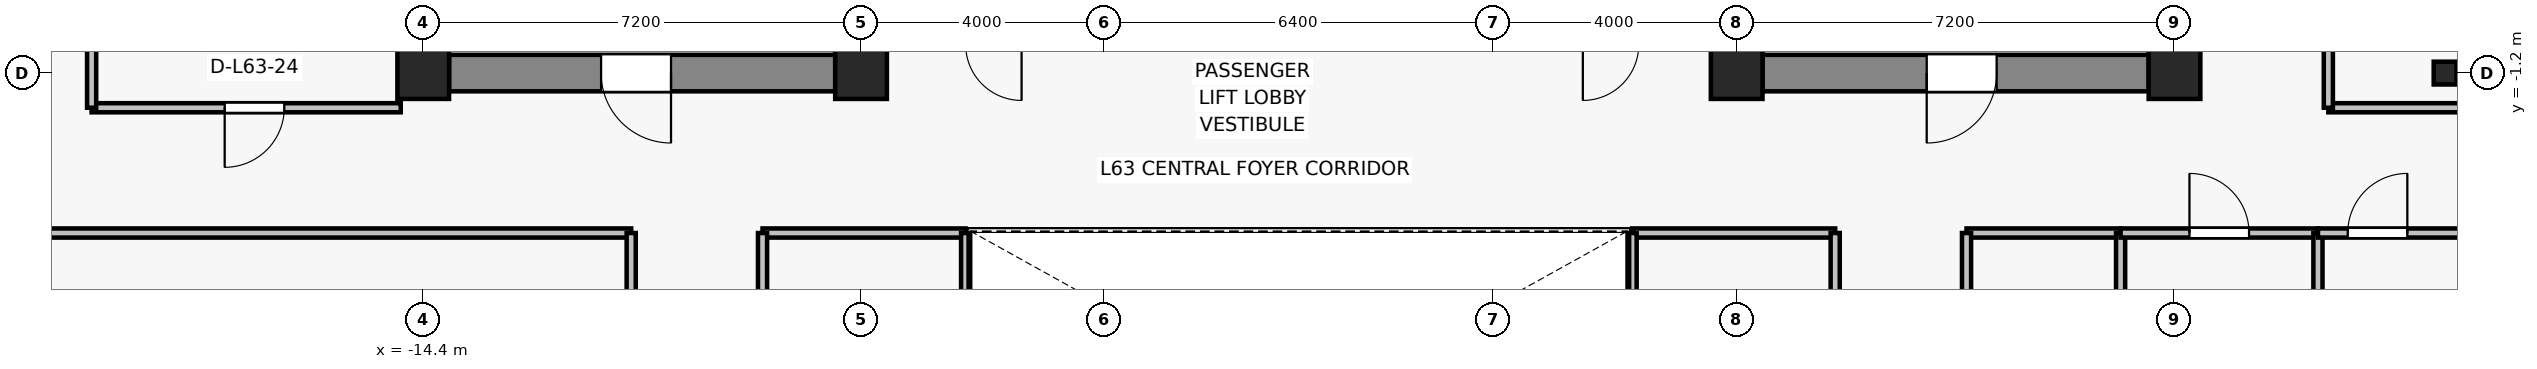
"""IFC4 building model, lengths in metres.
Left out: names, types, materials, properties, quantities, classifications, styles, units other than length and angle.
Written with IfcOpenShell. Run it as: python <this file> out.ifc"""

import sys

from ifc_helpers import new_model, si_unit, direction, frame, frame_2d, origin, origin_2d, place, context, subcontext, project, spatial, rectangle, i_section, extrude, source, transform, mapped, element, fill, save


model = new_model("IFC4")
c1 = context("Model", 3, precision=1e-05, world=origin(), true_north=direction((0.0, 1.0)))
c2 = subcontext(c1, "Body", "Model", "MODEL_VIEW")
j1 = project(units=[si_unit("LENGTHUNIT", "METRE"), si_unit("PLANEANGLEUNIT", "RADIAN")], contexts=[c1])
p1 = place(None, origin())
s1 = spatial("IfcSite", under=j1, at=p1, CompositionType="ELEMENT")
p2 = place(p1, origin())
s2 = spatial("IfcBuilding", under=s1, at=p2, CompositionType="ELEMENT")
p3 = place(p2, frame((0.0, 0.0, 225.4)))
s3 = spatial("IfcBuildingStorey", under=s2, at=p3, CompositionType="ELEMENT", Elevation=225.4)
for number, where, z_axis, x_axis in (
    (1, (-14.4, -1.2, 0.0), (0.0, 0.0, 1.0), (1.0, 0.0, 0.0)),
    (2, (-7.2, -1.2, 0.0), (0.0, 0.0, 1.0), (1.0, 0.0, 0.0)),
    (3, (7.2, -1.2, 0.0), (0.0, 0.0, 1.0), (1.0, 0.0, 0.0)),
    (4, (14.4, -1.2, 0.0), (0.0, 0.0, 1.0), (1.0, 0.0, 0.0)),
):
    element("IfcColumn", number, at=place(p3, frame(where, z_axis=z_axis, x_axis=x_axis)), inside=s3, PredefinedType="COLUMN", context=c2, shape_type="SweptSolid", body=[
        extrude(rectangle(XDim=0.85, YDim=0.85, at=origin_2d()), origin(), (0.0, 0.0, 1.0), 3.3),
    ])
p4 = place(p3, frame((18.85, -1.2, 0.0), z_axis=(0.0, 0.0, 1.0), x_axis=(1.0, 0.0, 0.0)))
e5 = element("IfcColumn", 5, at=p4, inside=s3, PredefinedType="COLUMN", context=c2, shape_type="SweptSolid", body=[
    extrude(i_section(OverallWidth=0.375, OverallDepth=0.375, WebThickness=0.017, FlangeThickness=0.027, FilletRadius=0.015, at=origin_2d()), origin(), (0.0, 0.0, 1.0), 3.3),
])
p5 = place(p3, frame((-7.625, -1.2, 0.0), z_axis=(0.0, 0.0, 1.0), x_axis=(-1.0, 0.0, 0.0)))
e6 = element("IfcWall", 6, at=p5, inside=s3, PredefinedType="SHEAR", context=c2, shape_type="SweptSolid", body=[
    extrude(rectangle(XDim=6.35, YDim=0.6, at=frame_2d((3.175, 0.0))), origin(), (0.0, 0.0, 1.0), 3.075),
])
p6 = place(p5, frame((2.7, 0.0, 0.0)))
e7 = element("IfcOpeningElement", 7, at=p6, cuts=e6, PredefinedType="OPENING", context=c2, shape_type="SweptSolid", body=[
    extrude(rectangle(XDim=1.15, YDim=2.15, at=frame_2d((0.575, 1.075))), frame((0.0, 0.31, 0.0), z_axis=(0.0, -1.0, 0.0), x_axis=(1.0, 0.0, 0.0)), (0.0, 0.0, 1.0), 0.62),
])
p7 = place(p3, frame((13.975, -1.2, 0.0), z_axis=(0.0, 0.0, 1.0), x_axis=(-1.0, 0.0, 0.0)))
e8 = element("IfcWall", 8, at=p7, inside=s3, PredefinedType="SHEAR", context=c2, shape_type="SweptSolid", body=[
    extrude(rectangle(XDim=6.35, YDim=0.6, at=frame_2d((3.175, 0.0))), origin(), (0.0, 0.0, 1.0), 3.075),
])
p8 = place(p7, frame((2.5, 0.0, 0.0)))
e9 = element("IfcOpeningElement", 9, at=p8, cuts=e8, PredefinedType="OPENING", context=c2, shape_type="SweptSolid", body=[
    extrude(rectangle(XDim=1.15, YDim=2.15, at=frame_2d((0.575, 1.075))), frame((0.0, 0.31, 0.0), z_axis=(0.0, -1.0, 0.0), x_axis=(1.0, 0.0, 0.0)), (0.0, 0.0, 1.0), 0.62),
])
for number, where, z_axis, x_axis in (
    (10, (-7.4, -0.9, 0.0), (0.0, 0.0, 1.0), (0.0, 1.0, 0.0)),
    (11, (7.4, -0.9, 0.0), (0.0, 0.0, 1.0), (0.0, 1.0, 0.0)),
):
    element("IfcWall", number, at=place(p3, frame(where, z_axis=z_axis, x_axis=x_axis)), inside=s3, PredefinedType="SHEAR", context=c2, shape_type="SweptSolid", body=[
        extrude(rectangle(XDim=4.15, YDim=0.45, at=frame_2d((2.075, 0.0))), origin(), (0.0, 0.0, 1.0), 3.075),
    ])
p9 = place(p3, frame((-23.53, -3.83, 0.0), z_axis=(0.0, 0.0, 1.0), x_axis=(1.0, 0.0, 0.0)))
e12 = element("IfcWall", 12, at=p9, inside=s3, PredefinedType="PARTITIONING", context=c2, shape_type="SweptSolid", body=[
    extrude(rectangle(XDim=12.55, YDim=0.15, at=frame_2d((6.275, 0.0))), origin(), (0.0, 0.0, 1.0), 2.615),
])
p10 = place(p3, frame((-10.98, -3.83, 0.0), z_axis=(0.0, 0.0, 1.0), x_axis=(0.0, -1.0, 0.0)))
e13 = element("IfcWall", 13, at=p10, inside=s3, PredefinedType="PARTITIONING", context=c2, shape_type="SweptSolid", body=[
    extrude(rectangle(XDim=13.2, YDim=0.15, at=frame_2d((6.6, 0.0))), origin(), (0.0, 0.0, 1.0), 2.615),
])
p11 = place(p10, frame((2.88, 0.0, 0.0)))
e14 = element("IfcOpeningElement", 14, at=p11, cuts=e13, PredefinedType="OPENING", context=c2, shape_type="SweptSolid", body=[
    extrude(rectangle(XDim=0.98, YDim=2.15, at=frame_2d((0.49, 1.075))), frame((0.0, 0.085, 0.0), z_axis=(0.0, -1.0, 0.0), x_axis=(1.0, 0.0, 0.0)), (0.0, 0.0, 1.0), 0.17),
])
p12 = place(p3, frame((10.98, -3.83, 0.0), z_axis=(0.0, 0.0, 1.0), x_axis=(1.0, 0.0, 0.0)))
e15 = element("IfcWall", 15, at=p12, inside=s3, PredefinedType="PARTITIONING", context=c2, shape_type="SweptSolid", body=[
    extrude(rectangle(XDim=2.533, YDim=0.15, at=frame_2d((1.267, 0.0))), origin(), (0.0, 0.0, 1.0), 3.075),
])
p13 = place(p3, frame((10.98, -17.03, 0.0), z_axis=(0.0, 0.0, 1.0), x_axis=(0.0, 1.0, 0.0)))
e16 = element("IfcWall", 16, at=p13, inside=s3, PredefinedType="PARTITIONING", context=c2, shape_type="SweptSolid", body=[
    extrude(rectangle(XDim=13.2, YDim=0.15, at=frame_2d((6.6, 0.0))), origin(), (0.0, 0.0, 1.0), 2.615),
])
p14 = place(p13, frame((9.34, 0.0, 0.0)))
e17 = element("IfcOpeningElement", 17, at=p14, cuts=e16, PredefinedType="OPENING", context=c2, shape_type="SweptSolid", body=[
    extrude(rectangle(XDim=0.98, YDim=2.15, at=frame_2d((0.49, 1.075))), frame((0.0, 0.085, 0.0), z_axis=(0.0, -1.0, 0.0), x_axis=(1.0, 0.0, 0.0)), (0.0, 0.0, 1.0), 0.17),
])
p15 = place(p3, frame((13.513, -3.83, 0.0), z_axis=(0.0, 0.0, 1.0), x_axis=(0.0, -1.0, 0.0)))
e18 = element("IfcWall", 18, at=p15, inside=s3, PredefinedType="PARTITIONING", context=c2, shape_type="SweptSolid", body=[
    extrude(rectangle(XDim=13.2, YDim=0.15, at=frame_2d((6.6, 0.0))), origin(), (0.0, 0.0, 1.0), 2.615),
])
p16 = place(p3, frame((13.513, -3.83, 0.0), z_axis=(0.0, 0.0, 1.0), x_axis=(1.0, 0.0, 0.0)))
e19 = element("IfcWall", 19, at=p16, inside=s3, PredefinedType="PARTITIONING", context=c2, shape_type="SweptSolid", body=[
    extrude(rectangle(XDim=3.246, YDim=0.15, at=frame_2d((1.623, 0.0))), origin(), (0.0, 0.0, 1.0), 2.615),
])
p17 = place(p16, frame((1.133, 0.0, 0.0)))
e20 = element("IfcOpeningElement", 20, at=p17, cuts=e19, PredefinedType="OPENING", context=c2, shape_type="SweptSolid", body=[
    extrude(rectangle(XDim=0.98, YDim=2.15, at=frame_2d((0.49, 1.075))), frame((0.0, 0.085, 0.0), z_axis=(0.0, -1.0, 0.0), x_axis=(1.0, 0.0, 0.0)), (0.0, 0.0, 1.0), 0.17),
])
p18 = place(p3, frame((16.759, -3.83, 0.0), z_axis=(0.0, 0.0, 1.0), x_axis=(0.0, -1.0, 0.0)))
e21 = element("IfcWall", 21, at=p18, inside=s3, PredefinedType="PARTITIONING", context=c2, shape_type="SweptSolid", body=[
    extrude(rectangle(XDim=13.2, YDim=0.15, at=frame_2d((6.6, 0.0))), origin(), (0.0, 0.0, 1.0), 2.615),
])
p19 = place(p3, frame((16.759, -3.83, 0.0), z_axis=(0.0, 0.0, 1.0), x_axis=(1.0, 0.0, 0.0)))
e22 = element("IfcWall", 22, at=p19, inside=s3, PredefinedType="PARTITIONING", context=c2, shape_type="SweptSolid", body=[
    extrude(rectangle(XDim=2.771, YDim=0.15, at=frame_2d((1.385, 0.0))), origin(), (0.0, 0.0, 1.0), 2.765),
])
p20 = place(p19, frame((0.49, 0.0, 0.0)))
e23 = element("IfcOpeningElement", 23, at=p20, cuts=e22, PredefinedType="OPENING", context=c2, shape_type="SweptSolid", body=[
    extrude(rectangle(XDim=0.98, YDim=2.15, at=frame_2d((0.49, 1.075))), frame((0.0, 0.085, 0.0), z_axis=(0.0, -1.0, 0.0), x_axis=(1.0, 0.0, 0.0)), (0.0, 0.0, 1.0), 0.17),
])
p21 = place(p3, frame((-8.82, -3.83, 0.0), z_axis=(0.0, 0.0, 1.0), x_axis=(1.0, 0.0, 0.0)))
e24 = element("IfcWall", 24, at=p21, inside=s3, PredefinedType="PARTITIONING", context=c2, shape_type="SweptSolid", body=[
    extrude(rectangle(XDim=3.34, YDim=0.15, at=frame_2d((1.67, 0.0))), origin(), (0.0, 0.0, 1.0), 2.615),
])
p22 = place(p3, frame((-8.82, -17.03, 0.0), z_axis=(0.0, 0.0, 1.0), x_axis=(0.0, 1.0, 0.0)))
e25 = element("IfcWall", 25, at=p22, inside=s3, PredefinedType="PARTITIONING", context=c2, shape_type="SweptSolid", body=[
    extrude(rectangle(XDim=13.2, YDim=0.15, at=frame_2d((6.6, 0.0))), origin(), (0.0, 0.0, 1.0), 2.615),
])
p23 = place(p22, frame((9.385, 0.0, 0.0)))
e26 = element("IfcOpeningElement", 26, at=p23, cuts=e25, PredefinedType="OPENING", context=c2, shape_type="SweptSolid", body=[
    extrude(rectangle(XDim=0.98, YDim=2.15, at=frame_2d((0.49, 1.075))), frame((0.0, 0.085, 0.0), z_axis=(0.0, -1.0, 0.0), x_axis=(1.0, 0.0, 0.0)), (0.0, 0.0, 1.0), 0.17),
])
p24 = place(p3, frame((-5.48, -3.83, 0.0), z_axis=(0.0, 0.0, 1.0), x_axis=(0.0, -1.0, 0.0)))
e27 = element("IfcWall", 27, at=p24, inside=s3, PredefinedType="PARTITIONING", context=c2, shape_type="SweptSolid", body=[
    extrude(rectangle(XDim=13.2, YDim=0.15, at=frame_2d((6.6, 0.0))), origin(), (0.0, 0.0, 1.0), 2.615),
])
p25 = place(p24, frame((7.22, 0.0, 0.0)))
e28 = element("IfcOpeningElement", 28, at=p25, cuts=e27, PredefinedType="OPENING", context=c2, shape_type="SweptSolid", body=[
    extrude(rectangle(XDim=0.98, YDim=2.15, at=frame_2d((0.49, 1.075))), frame((0.0, 0.085, 0.0), z_axis=(0.0, -1.0, 0.0), x_axis=(1.0, 0.0, 0.0)), (0.0, 0.0, 1.0), 0.17),
])
p26 = place(p3, frame((5.48, -3.83, 0.0), z_axis=(0.0, 0.0, 1.0), x_axis=(1.0, 0.0, 0.0)))
e29 = element("IfcWall", 29, at=p26, inside=s3, PredefinedType="PARTITIONING", context=c2, shape_type="SweptSolid", body=[
    extrude(rectangle(XDim=3.34, YDim=0.15, at=frame_2d((1.67, 0.0))), origin(), (0.0, 0.0, 1.0), 2.615),
])
p27 = place(p3, frame((5.48, -17.03, 0.0), z_axis=(0.0, 0.0, 1.0), x_axis=(0.0, 1.0, 0.0)))
e30 = element("IfcWall", 30, at=p27, inside=s3, PredefinedType="PARTITIONING", context=c2, shape_type="SweptSolid", body=[
    extrude(rectangle(XDim=13.2, YDim=0.15, at=frame_2d((6.6, 0.0))), origin(), (0.0, 0.0, 1.0), 2.615),
])
p28 = place(p3, frame((8.82, -3.83, 0.0), z_axis=(0.0, 0.0, 1.0), x_axis=(0.0, -1.0, 0.0)))
e31 = element("IfcWall", 31, at=p28, inside=s3, PredefinedType="PARTITIONING", context=c2, shape_type="SweptSolid", body=[
    extrude(rectangle(XDim=13.2, YDim=0.15, at=frame_2d((6.6, 0.0))), origin(), (0.0, 0.0, 1.0), 2.615),
])
p29 = place(p28, frame((2.835, 0.0, 0.0)))
e32 = element("IfcOpeningElement", 32, at=p29, cuts=e31, PredefinedType="OPENING", context=c2, shape_type="SweptSolid", body=[
    extrude(rectangle(XDim=0.98, YDim=2.15, at=frame_2d((0.49, 1.075))), frame((0.0, 0.085, 0.0), z_axis=(0.0, -1.0, 0.0), x_axis=(1.0, 0.0, 0.0)), (0.0, 0.0, 1.0), 0.17),
])
p30 = place(p3, frame((-14.77, -1.77, 0.0), z_axis=(0.0, 0.0, 1.0), x_axis=(-1.0, 0.0, 0.0)))
e33 = element("IfcWall", 33, at=p30, inside=s3, PredefinedType="PARTITIONING", context=c2, shape_type="SweptSolid", body=[
    extrude(rectangle(XDim=5.083, YDim=0.15, at=frame_2d((2.542, 0.0))), origin(), (0.0, 0.0, 1.0), 3.075),
])
p31 = place(p30, frame((1.915, 0.0, 0.0)))
e34 = element("IfcOpeningElement", 34, at=p31, cuts=e33, PredefinedType="OPENING", context=c2, shape_type="SweptSolid", body=[
    extrude(rectangle(XDim=0.98, YDim=2.15, at=frame_2d((0.49, 1.075))), frame((0.0, 0.085, 0.0), z_axis=(0.0, -1.0, 0.0), x_axis=(1.0, 0.0, 0.0)), (0.0, 0.0, 1.0), 0.17),
])
p32 = place(p3, frame((-19.853, -1.77, 0.0), z_axis=(0.0, 0.0, 1.0), x_axis=(0.0, 1.0, 0.0)))
e35 = element("IfcWall", 35, at=p32, inside=s3, PredefinedType="PARTITIONING", context=c2, shape_type="SweptSolid", body=[
    extrude(rectangle(XDim=15.65, YDim=0.15, at=frame_2d((7.825, 0.0))), origin(), (0.0, 0.0, 1.0), 2.615),
])
p33 = place(p3, frame((19.53, -1.77, 0.0), z_axis=(0.0, 0.0, 1.0), x_axis=(-1.0, 0.0, 0.0)))
e36 = element("IfcWall", 36, at=p33, inside=s3, PredefinedType="PARTITIONING", context=c2, shape_type="SweptSolid", body=[
    extrude(rectangle(XDim=2.6, YDim=0.15, at=frame_2d((1.3, 0.0))), origin(), (0.0, 0.0, 1.0), 2.765),
])
p34 = place(p3, frame((16.93, -1.77, 0.0), z_axis=(0.0, 0.0, 1.0), x_axis=(0.0, 1.0, 0.0)))
e37 = element("IfcWall", 37, at=p34, inside=s3, PredefinedType="PARTITIONING", context=c2, shape_type="SweptSolid", body=[
    extrude(rectangle(XDim=15.65, YDim=0.15, at=frame_2d((7.825, 0.0))), origin(), (0.0, 0.0, 1.0), 2.615),
])
p35 = place(p34, frame((7.335, 0.0, 0.0)))
e38 = element("IfcOpeningElement", 38, at=p35, cuts=e37, PredefinedType="OPENING", context=c2, shape_type="SweptSolid", body=[
    extrude(rectangle(XDim=0.98, YDim=2.15, at=frame_2d((0.49, 1.075))), frame((0.0, 0.085, 0.0), z_axis=(0.0, -1.0, 0.0), x_axis=(1.0, 0.0, 0.0)), (0.0, 0.0, 1.0), 0.17),
])
m1 = source(origin(), c2, "Body", "SweptSolid", [
    extrude(rectangle(XDim=1.15, YDim=2.15, at=frame_2d((0.575, 1.075))), frame((0.0, 0.025, 0.0), z_axis=(0.0, -1.0, 0.0), x_axis=(1.0, 0.0, 0.0)), (0.0, 0.0, 1.0), 0.05),
])
p36 = place(p6, origin())
e39 = element("IfcDoor", 39, at=p36, inside=s3, OperationType="SINGLE_SWING_LEFT", PredefinedType="DOOR", context=c2, shape_type="MappedRepresentation", body=[
    mapped(m1, transform((0.0, 0.0, 0.0), x_axis=(1.0, 0.0, 0.0), y_axis=(0.0, 1.0, 0.0), z_axis=(0.0, 0.0, 1.0), scale=1.0)),
])
fill(e7, e39)
p37 = place(p8, origin())
e40 = element("IfcDoor", 40, at=p37, inside=s3, OperationType="SINGLE_SWING_RIGHT", PredefinedType="DOOR", context=c2, shape_type="MappedRepresentation", body=[
    mapped(m1, transform((0.0, 0.0, 0.0), x_axis=(1.0, 0.0, 0.0), y_axis=(0.0, 1.0, 0.0), z_axis=(0.0, 0.0, 1.0), scale=1.0)),
])
fill(e9, e40)
m2 = source(origin(), c2, "Body", "SweptSolid", [
    extrude(rectangle(XDim=0.98, YDim=2.15, at=frame_2d((0.49, 1.075))), frame((0.0, 0.025, 0.0), z_axis=(0.0, -1.0, 0.0), x_axis=(1.0, 0.0, 0.0)), (0.0, 0.0, 1.0), 0.05),
])
p38 = place(p17, origin())
e41 = element("IfcDoor", 41, at=p38, inside=s3, OperationType="SINGLE_SWING_LEFT", PredefinedType="DOOR", context=c2, shape_type="MappedRepresentation", body=[
    mapped(m2, transform((0.0, 0.0, 0.0), x_axis=(1.0, 0.0, 0.0), y_axis=(0.0, 1.0, 0.0), z_axis=(0.0, 0.0, 1.0), scale=1.0)),
])
fill(e20, e41)
p39 = place(p20, origin())
e42 = element("IfcDoor", 42, at=p39, inside=s3, OperationType="SINGLE_SWING_RIGHT", PredefinedType="DOOR", context=c2, shape_type="MappedRepresentation", body=[
    mapped(m2, transform((0.0, 0.0, 0.0), x_axis=(1.0, 0.0, 0.0), y_axis=(0.0, 1.0, 0.0), z_axis=(0.0, 0.0, 1.0), scale=1.0)),
])
fill(e23, e42)
p40 = place(p31, origin())
e43 = element("IfcDoor", 43, at=p40, inside=s3, OperationType="SINGLE_SWING_RIGHT", PredefinedType="DOOR", context=c2, shape_type="MappedRepresentation", body=[
    mapped(m2, transform((0.0, 0.0, 0.0), x_axis=(1.0, 0.0, 0.0), y_axis=(0.0, 1.0, 0.0), z_axis=(0.0, 0.0, 1.0), scale=1.0)),
])
fill(e34, e43)
save(model, sys.argv[1])
